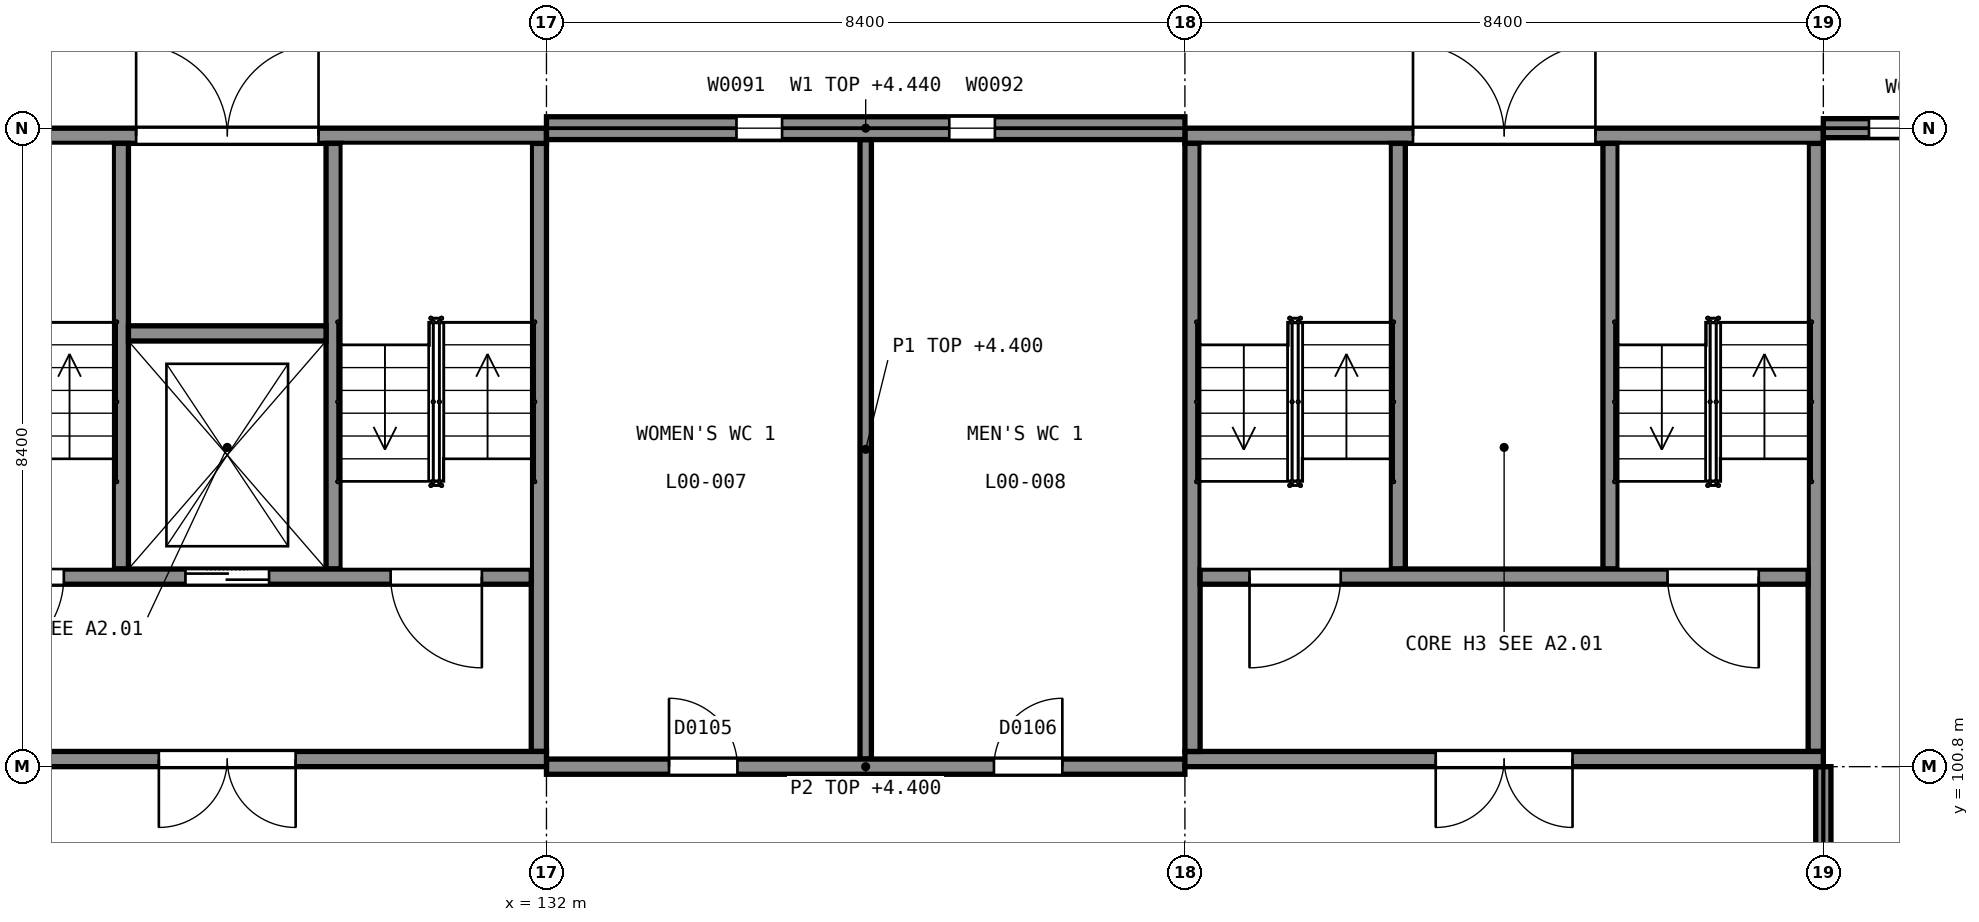
"""IFC4 building model, lengths in metres.
Left out: names, types, materials, properties, quantities, classifications, styles, units other than length and angle.
Written with IfcOpenShell. Run it as: python <this file> out.ifc"""

import sys

from ifc_helpers import new_model, si_unit, direction, frame, frame_2d, origin, place, context, subcontext, project, spatial, rectangle, extrude, element, fill, save


model = new_model("IFC4")
c1 = context("Model", 3, precision=1e-05, world=origin(), true_north=direction((0.0, 1.0)))
c2 = subcontext(c1, "Body", "Model", "MODEL_VIEW")
j1 = project(units=[si_unit("LENGTHUNIT", "METRE"), si_unit("PLANEANGLEUNIT", "RADIAN")], contexts=[c1])
p1 = place(None, origin())
s1 = spatial("IfcSite", under=j1, at=p1, CompositionType="ELEMENT")
p2 = place(p1, origin())
s2 = spatial("IfcBuilding", under=s1, at=p2, CompositionType="ELEMENT")
p3 = place(p2, origin())
s3 = spatial("IfcBuildingStorey", under=s2, at=p3, CompositionType="ELEMENT", Elevation=0.0)
p4 = place(p3, frame((140.4, 100.9, -1.8), z_axis=(0.0, 0.0, 1.0), x_axis=(1.0, 0.0, 0.0)))
e1 = element("IfcWall", 1, at=p4, inside=s3, PredefinedType="SHEAR", context=c2, shape_type="SweptSolid", body=[
    extrude(rectangle(XDim=8.4, YDim=0.2, at=frame_2d((4.2, 0.0))), origin(), (0.0, 0.0, 1.0), 7.3),
])
p5 = place(p4, frame((3.3, 0.0, 1.8)))
e2 = element("IfcOpeningElement", 2, at=p5, cuts=e1, PredefinedType="OPENING", context=c2, shape_type="SweptSolid", body=[
    extrude(rectangle(XDim=1.8, YDim=2.1, at=frame_2d((0.9, 1.05))), frame((0.0, 0.11, 0.0), z_axis=(0.0, -1.0, 0.0), x_axis=(1.0, 0.0, 0.0)), (0.0, 0.0, 1.0), 0.22),
])
p6 = place(p3, frame((140.4, 109.1, -1.8), z_axis=(0.0, 0.0, 1.0), x_axis=(1.0, 0.0, 0.0)))
e3 = element("IfcWall", 3, at=p6, inside=s3, PredefinedType="SHEAR", context=c2, shape_type="SweptSolid", body=[
    extrude(rectangle(XDim=8.4, YDim=0.2, at=frame_2d((4.2, 0.0))), origin(), (0.0, 0.0, 1.0), 7.3),
])
p7 = place(p6, frame((3.001, 0.0, 1.8)))
e4 = element("IfcOpeningElement", 4, at=p7, cuts=e3, PredefinedType="OPENING", context=c2, shape_type="SweptSolid", body=[
    extrude(rectangle(XDim=2.4, YDim=2.1, at=frame_2d((1.2, 1.05))), frame((0.0, 0.11, 0.0), z_axis=(0.0, -1.0, 0.0), x_axis=(1.0, 0.0, 0.0)), (0.0, 0.0, 1.0), 0.22),
])
for number, where, z_axis, x_axis in (
    (5, (140.5, 101.0, -1.8), (0.0, 0.0, 1.0), (0.0, 1.0, 0.0)),
    (6, (148.7, 101.0, -1.8), (0.0, 0.0, 1.0), (0.0, 1.0, 0.0)),
):
    element("IfcWall", number, at=place(p3, frame(where, z_axis=z_axis, x_axis=x_axis)), inside=s3, PredefinedType="SHEAR", context=c2, shape_type="SweptSolid", body=[
        extrude(rectangle(XDim=8.0, YDim=0.2, at=frame_2d((4.0, 0.0))), origin(), (0.0, 0.0, 1.0), 7.3),
    ])
p8 = place(p3, frame((140.6, 103.3, -1.8), z_axis=(0.0, 0.0, 1.0), x_axis=(1.0, 0.0, 0.0)))
e7 = element("IfcWall", 7, at=p8, inside=s3, PredefinedType="SHEAR", context=c2, shape_type="SweptSolid", body=[
    extrude(rectangle(XDim=8.0, YDim=0.2, at=frame_2d((4.0, 0.0))), origin(), (0.0, 0.0, 1.0), 7.3),
])
p9 = place(p8, frame((0.65, 0.0, 1.8)))
e8 = element("IfcOpeningElement", 8, at=p9, cuts=e7, PredefinedType="OPENING", context=c2, shape_type="SweptSolid", body=[
    extrude(rectangle(XDim=1.2, YDim=2.1, at=frame_2d((0.6, 1.05))), frame((0.0, 0.11, 0.0), z_axis=(0.0, -1.0, 0.0), x_axis=(1.0, 0.0, 0.0)), (0.0, 0.0, 1.0), 0.22),
])
p10 = place(p8, frame((6.15, 0.0, 1.8)))
e9 = element("IfcOpeningElement", 9, at=p10, cuts=e7, PredefinedType="OPENING", context=c2, shape_type="SweptSolid", body=[
    extrude(rectangle(XDim=1.2, YDim=2.1, at=frame_2d((0.6, 1.05))), frame((0.0, 0.11, 0.0), z_axis=(0.0, -1.0, 0.0), x_axis=(1.0, 0.0, 0.0)), (0.0, 0.0, 1.0), 0.22),
])
for number, where, z_axis, x_axis in (
    (10, (143.2, 103.4, -1.8), (0.0, 0.0, 1.0), (0.0, 1.0, 0.0)),
    (11, (146.0, 103.4, -1.8), (0.0, 0.0, 1.0), (0.0, 1.0, 0.0)),
):
    element("IfcWall", number, at=place(p3, frame(where, z_axis=z_axis, x_axis=x_axis)), inside=s3, PredefinedType="SHEAR", context=c2, shape_type="SweptSolid", body=[
        extrude(rectangle(XDim=5.6, YDim=0.2, at=frame_2d((2.8, 0.0))), origin(), (0.0, 0.0, 1.0), 7.3),
    ])
p11 = place(p3, frame((123.6, 100.9, -1.8), z_axis=(0.0, 0.0, 1.0), x_axis=(1.0, 0.0, 0.0)))
e12 = element("IfcWall", 12, at=p11, inside=s3, PredefinedType="SHEAR", context=c2, shape_type="SweptSolid", body=[
    extrude(rectangle(XDim=8.4, YDim=0.2, at=frame_2d((4.2, 0.0))), origin(), (0.0, 0.0, 1.0), 7.3),
])
p12 = place(p11, frame((3.3, 0.0, 1.8)))
e13 = element("IfcOpeningElement", 13, at=p12, cuts=e12, PredefinedType="OPENING", context=c2, shape_type="SweptSolid", body=[
    extrude(rectangle(XDim=1.8, YDim=2.1, at=frame_2d((0.9, 1.05))), frame((0.0, 0.11, 0.0), z_axis=(0.0, -1.0, 0.0), x_axis=(1.0, 0.0, 0.0)), (0.0, 0.0, 1.0), 0.22),
])
p13 = place(p3, frame((123.6, 109.1, -1.8), z_axis=(0.0, 0.0, 1.0), x_axis=(1.0, 0.0, 0.0)))
e14 = element("IfcWall", 14, at=p13, inside=s3, PredefinedType="SHEAR", context=c2, shape_type="SweptSolid", body=[
    extrude(rectangle(XDim=8.4, YDim=0.2, at=frame_2d((4.2, 0.0))), origin(), (0.0, 0.0, 1.0), 7.3),
])
p14 = place(p13, frame((3.001, 0.0, 1.8)))
e15 = element("IfcOpeningElement", 15, at=p14, cuts=e14, PredefinedType="OPENING", context=c2, shape_type="SweptSolid", body=[
    extrude(rectangle(XDim=2.4, YDim=2.1, at=frame_2d((1.2, 1.05))), frame((0.0, 0.11, 0.0), z_axis=(0.0, -1.0, 0.0), x_axis=(1.0, 0.0, 0.0)), (0.0, 0.0, 1.0), 0.22),
])
p15 = place(p3, frame((131.9, 101.0, -1.8), z_axis=(0.0, 0.0, 1.0), x_axis=(0.0, 1.0, 0.0)))
e16 = element("IfcWall", 16, at=p15, inside=s3, PredefinedType="SHEAR", context=c2, shape_type="SweptSolid", body=[
    extrude(rectangle(XDim=8.0, YDim=0.2, at=frame_2d((4.0, 0.0))), origin(), (0.0, 0.0, 1.0), 7.3),
])
p16 = place(p3, frame((123.8, 103.3, -1.8), z_axis=(0.0, 0.0, 1.0), x_axis=(1.0, 0.0, 0.0)))
e17 = element("IfcWall", 17, at=p16, inside=s3, PredefinedType="SHEAR", context=c2, shape_type="SweptSolid", body=[
    extrude(rectangle(XDim=8.0, YDim=0.2, at=frame_2d((4.0, 0.0))), origin(), (0.0, 0.0, 1.0), 7.3),
])
p17 = place(p16, frame((0.65, 0.0, 1.8)))
e18 = element("IfcOpeningElement", 18, at=p17, cuts=e17, PredefinedType="OPENING", context=c2, shape_type="SweptSolid", body=[
    extrude(rectangle(XDim=1.2, YDim=2.1, at=frame_2d((0.6, 1.05))), frame((0.0, 0.11, 0.0), z_axis=(0.0, -1.0, 0.0), x_axis=(1.0, 0.0, 0.0)), (0.0, 0.0, 1.0), 0.22),
])
p18 = place(p16, frame((6.15, 0.0, 1.8)))
e19 = element("IfcOpeningElement", 19, at=p18, cuts=e17, PredefinedType="OPENING", context=c2, shape_type="SweptSolid", body=[
    extrude(rectangle(XDim=1.2, YDim=2.1, at=frame_2d((0.6, 1.05))), frame((0.0, 0.11, 0.0), z_axis=(0.0, -1.0, 0.0), x_axis=(1.0, 0.0, 0.0)), (0.0, 0.0, 1.0), 0.22),
])
p19 = place(p16, frame((3.45, 0.0, 1.8)))
e20 = element("IfcOpeningElement", 20, at=p19, cuts=e17, PredefinedType="OPENING", context=c2, shape_type="SweptSolid", body=[
    extrude(rectangle(XDim=1.1, YDim=2.1, at=frame_2d((0.55, 1.05))), frame((0.0, 0.11, 0.0), z_axis=(0.0, -1.0, 0.0), x_axis=(1.0, 0.0, 0.0)), (0.0, 0.0, 1.0), 0.22),
])
for number, where, z_axis, x_axis in (
    (21, (126.4, 103.4, -1.8), (0.0, 0.0, 1.0), (0.0, 1.0, 0.0)),
    (22, (129.2, 103.4, -1.8), (0.0, 0.0, 1.0), (0.0, 1.0, 0.0)),
):
    element("IfcWall", number, at=place(p3, frame(where, z_axis=z_axis, x_axis=x_axis)), inside=s3, PredefinedType="SHEAR", context=c2, shape_type="SweptSolid", body=[
        extrude(rectangle(XDim=5.6, YDim=0.2, at=frame_2d((2.8, 0.0))), origin(), (0.0, 0.0, 1.0), 7.3),
    ])
p20 = place(p3, frame((126.5, 106.5, -1.8), z_axis=(0.0, 0.0, 1.0), x_axis=(1.0, 0.0, 0.0)))
e23 = element("IfcWall", 23, at=p20, inside=s3, PredefinedType="SHEAR", context=c2, shape_type="SweptSolid", body=[
    extrude(rectangle(XDim=2.6, YDim=0.2, at=frame_2d((1.3, 0.0))), origin(), (0.0, 0.0, 1.0), 7.3),
])
p21 = place(p3, frame((148.8, 109.2, 0.0), z_axis=(0.0, 0.0, 1.0), x_axis=(1.0, 0.0, 0.0)))
e24 = element("IfcWall", 24, at=p21, inside=s3, PredefinedType="SOLIDWALL", context=c2, shape_type="SweptSolid", body=[
    extrude(rectangle(XDim=8.0, YDim=0.25, at=frame_2d((4.0, 0.0))), origin(), (0.0, 0.0, 1.0), 4.44),
])
p22 = place(p21, frame((0.6, 0.0, 0.9)))
e25 = element("IfcOpeningElement", 25, at=p22, cuts=e24, PredefinedType="OPENING", context=c2, shape_type="SweptSolid", body=[
    extrude(rectangle(XDim=1.2, YDim=2.1, at=frame_2d((0.6, 1.05))), frame((0.0, 0.135, 0.0), z_axis=(0.0, -1.0, 0.0), x_axis=(1.0, 0.0, 0.0)), (0.0, 0.0, 1.0), 0.27),
])
p23 = place(p21, frame((3.4, 0.0, 0.9)))
e26 = element("IfcOpeningElement", 26, at=p23, cuts=e24, PredefinedType="OPENING", context=c2, shape_type="SweptSolid", body=[
    extrude(rectangle(XDim=1.2, YDim=2.1, at=frame_2d((0.6, 1.05))), frame((0.0, 0.135, 0.0), z_axis=(0.0, -1.0, 0.0), x_axis=(1.0, 0.0, 0.0)), (0.0, 0.0, 1.0), 0.27),
])
p24 = place(p21, frame((6.2, 0.0, 0.9)))
e27 = element("IfcOpeningElement", 27, at=p24, cuts=e24, PredefinedType="OPENING", context=c2, shape_type="SweptSolid", body=[
    extrude(rectangle(XDim=1.2, YDim=2.1, at=frame_2d((0.6, 1.05))), frame((0.0, 0.135, 0.0), z_axis=(0.0, -1.0, 0.0), x_axis=(1.0, 0.0, 0.0)), (0.0, 0.0, 1.0), 0.27),
])
p25 = place(p3, frame((132.0, 109.2, 0.0), z_axis=(0.0, 0.0, 1.0), x_axis=(1.0, 0.0, 0.0)))
e28 = element("IfcWall", 28, at=p25, inside=s3, PredefinedType="SOLIDWALL", context=c2, shape_type="SweptSolid", body=[
    extrude(rectangle(XDim=8.4, YDim=0.3, at=frame_2d((4.2, 0.0))), origin(), (0.0, 0.0, 1.0), 4.44),
])
p26 = place(p25, frame((2.5, 0.0, 1.5)))
e29 = element("IfcOpeningElement", 29, at=p26, cuts=e28, PredefinedType="OPENING", context=c2, shape_type="SweptSolid", body=[
    extrude(rectangle(XDim=0.6, YDim=2.4, at=frame_2d((0.3, 1.2))), frame((0.0, 0.16, 0.0), z_axis=(0.0, -1.0, 0.0), x_axis=(1.0, 0.0, 0.0)), (0.0, 0.0, 1.0), 0.32),
])
p27 = place(p25, frame((5.3, 0.0, 1.5)))
e30 = element("IfcOpeningElement", 30, at=p27, cuts=e28, PredefinedType="OPENING", context=c2, shape_type="SweptSolid", body=[
    extrude(rectangle(XDim=0.6, YDim=2.4, at=frame_2d((0.3, 1.2))), frame((0.0, 0.16, 0.0), z_axis=(0.0, -1.0, 0.0), x_axis=(1.0, 0.0, 0.0)), (0.0, 0.0, 1.0), 0.32),
])
p28 = place(p3, frame((136.2, 100.9, 0.0), z_axis=(0.0, 0.0, 1.0), x_axis=(0.0, 1.0, 0.0)))
e31 = element("IfcWall", 31, at=p28, inside=s3, PredefinedType="PARTITIONING", context=c2, shape_type="SweptSolid", body=[
    extrude(rectangle(XDim=8.15, YDim=0.15, at=frame_2d((4.075, 0.0))), origin(), (0.0, 0.0, 1.0), 4.4),
])
p29 = place(p3, frame((132.0, 100.8, 0.0), z_axis=(0.0, 0.0, 1.0), x_axis=(1.0, 0.0, 0.0)))
e32 = element("IfcWall", 32, at=p29, inside=s3, PredefinedType="PARTITIONING", context=c2, shape_type="SweptSolid", body=[
    extrude(rectangle(XDim=8.4, YDim=0.2, at=frame_2d((4.2, 0.0))), origin(), (0.0, 0.0, 1.0), 4.4),
])
p30 = place(p29, frame((1.613, 0.0, 0.0)))
e33 = element("IfcOpeningElement", 33, at=p30, cuts=e32, PredefinedType="OPENING", context=c2, shape_type="SweptSolid", body=[
    extrude(rectangle(XDim=0.9, YDim=2.1, at=frame_2d((0.45, 1.05))), frame((0.0, 0.11, 0.0), z_axis=(0.0, -1.0, 0.0), x_axis=(1.0, 0.0, 0.0)), (0.0, 0.0, 1.0), 0.22),
])
p31 = place(p29, frame((5.887, 0.0, 0.0)))
e34 = element("IfcOpeningElement", 34, at=p31, cuts=e32, PredefinedType="OPENING", context=c2, shape_type="SweptSolid", body=[
    extrude(rectangle(XDim=0.9, YDim=2.1, at=frame_2d((0.45, 1.05))), frame((0.0, 0.11, 0.0), z_axis=(0.0, -1.0, 0.0), x_axis=(1.0, 0.0, 0.0)), (0.0, 0.0, 1.0), 0.22),
])
p32 = place(p3, frame((148.8, 92.8, 0.0), z_axis=(0.0, 0.0, 1.0), x_axis=(0.0, 1.0, 0.0)))
e35 = element("IfcWall", 35, at=p32, inside=s3, PredefinedType="PARTITIONING", context=c2, shape_type="SweptSolid", body=[
    extrude(rectangle(XDim=8.0, YDim=0.2, at=frame_2d((4.0, 0.0))), origin(), (0.0, 0.0, 1.0), 4.4),
])
p33 = place(p32, frame((4.575, 0.0, 0.0)))
e36 = element("IfcOpeningElement", 36, at=p33, cuts=e35, PredefinedType="OPENING", context=c2, shape_type="SweptSolid", body=[
    extrude(rectangle(XDim=2.4, YDim=2.4, at=frame_2d((1.2, 1.2))), frame((0.0, 0.11, 0.0), z_axis=(0.0, -1.0, 0.0), x_axis=(1.0, 0.0, 0.0)), (0.0, 0.0, 1.0), 0.22),
])
p34 = place(p22, origin())
e37 = element("IfcWindow", 37, at=p34, inside=s3, PartitioningType="SINGLE_PANEL", PredefinedType="WINDOW", context=c2, shape_type="SweptSolid", body=[
    extrude(rectangle(XDim=1.2, YDim=2.1, at=frame_2d((0.6, 1.05))), frame((0.0, -0.045, 0.0), z_axis=(0.0, -1.0, 0.0), x_axis=(1.0, 0.0, 0.0)), (0.0, 0.0, 1.0), 0.06),
])
fill(e25, e37)
p35 = place(p26, origin())
e38 = element("IfcWindow", 38, at=p35, inside=s3, PartitioningType="SINGLE_PANEL", PredefinedType="WINDOW", context=c2, shape_type="SweptSolid", body=[
    extrude(rectangle(XDim=0.6, YDim=2.4, at=frame_2d((0.3, 1.2))), frame((0.0, -0.07, 0.0), z_axis=(0.0, -1.0, 0.0), x_axis=(1.0, 0.0, 0.0)), (0.0, 0.0, 1.0), 0.06),
])
fill(e29, e38)
p36 = place(p27, origin())
e39 = element("IfcWindow", 39, at=p36, inside=s3, PartitioningType="SINGLE_PANEL", PredefinedType="WINDOW", context=c2, shape_type="SweptSolid", body=[
    extrude(rectangle(XDim=0.6, YDim=2.4, at=frame_2d((0.3, 1.2))), frame((0.0, -0.07, 0.0), z_axis=(0.0, -1.0, 0.0), x_axis=(1.0, 0.0, 0.0)), (0.0, 0.0, 1.0), 0.06),
])
fill(e30, e39)
p37 = place(p7, origin())
e40 = element("IfcDoor", 40, at=p37, inside=s3, OperationType="DOUBLE_DOOR_SINGLE_SWING", PredefinedType="DOOR", context=c2, shape_type="SweptSolid", body=[
    extrude(rectangle(XDim=2.4, YDim=2.1, at=frame_2d((1.2, 1.05))), frame((0.0, 0.025, 0.0), z_axis=(0.0, -1.0, 0.0), x_axis=(1.0, 0.0, 0.0)), (0.0, 0.0, 1.0), 0.05),
])
fill(e4, e40)
p38 = place(p14, origin())
e41 = element("IfcDoor", 41, at=p38, inside=s3, OperationType="DOUBLE_DOOR_SINGLE_SWING", PredefinedType="DOOR", context=c2, shape_type="SweptSolid", body=[
    extrude(rectangle(XDim=2.4, YDim=2.1, at=frame_2d((1.2, 1.05))), frame((0.0, 0.025, 0.0), z_axis=(0.0, -1.0, 0.0), x_axis=(1.0, 0.0, 0.0)), (0.0, 0.0, 1.0), 0.05),
])
fill(e15, e41)
p39 = place(p30, origin())
e42 = element("IfcDoor", 42, at=p39, inside=s3, OperationType="SINGLE_SWING_RIGHT", PredefinedType="DOOR", context=c2, shape_type="SweptSolid", body=[
    extrude(rectangle(XDim=0.9, YDim=2.1, at=frame_2d((0.45, 1.05))), frame((0.0, 0.025, 0.0), z_axis=(0.0, -1.0, 0.0), x_axis=(1.0, 0.0, 0.0)), (0.0, 0.0, 1.0), 0.05),
])
fill(e33, e42)
p40 = place(p31, origin())
e43 = element("IfcDoor", 43, at=p40, inside=s3, OperationType="SINGLE_SWING_LEFT", PredefinedType="DOOR", context=c2, shape_type="SweptSolid", body=[
    extrude(rectangle(XDim=0.9, YDim=2.1, at=frame_2d((0.45, 1.05))), frame((0.0, 0.025, 0.0), z_axis=(0.0, -1.0, 0.0), x_axis=(1.0, 0.0, 0.0)), (0.0, 0.0, 1.0), 0.05),
])
fill(e34, e43)
p41 = place(p5, origin())
e44 = element("IfcDoor", 44, at=p41, inside=s3, OperationType="DOUBLE_DOOR_SINGLE_SWING", PredefinedType="DOOR", context=c2, shape_type="SweptSolid", body=[
    extrude(rectangle(XDim=1.8, YDim=2.1, at=frame_2d((0.9, 1.05))), frame((0.0, 0.025, 0.0), z_axis=(0.0, -1.0, 0.0), x_axis=(1.0, 0.0, 0.0)), (0.0, 0.0, 1.0), 0.05),
])
fill(e2, e44)
p42 = place(p9, origin())
e45 = element("IfcDoor", 45, at=p42, inside=s3, OperationType="SINGLE_SWING_LEFT", PredefinedType="DOOR", context=c2, shape_type="SweptSolid", body=[
    extrude(rectangle(XDim=1.2, YDim=2.1, at=frame_2d((0.6, 1.05))), frame((0.0, 0.025, 0.0), z_axis=(0.0, -1.0, 0.0), x_axis=(1.0, 0.0, 0.0)), (0.0, 0.0, 1.0), 0.05),
])
fill(e8, e45)
p43 = place(p10, origin())
e46 = element("IfcDoor", 46, at=p43, inside=s3, OperationType="SINGLE_SWING_RIGHT", PredefinedType="DOOR", context=c2, shape_type="SweptSolid", body=[
    extrude(rectangle(XDim=1.2, YDim=2.1, at=frame_2d((0.6, 1.05))), frame((0.0, 0.025, 0.0), z_axis=(0.0, -1.0, 0.0), x_axis=(1.0, 0.0, 0.0)), (0.0, 0.0, 1.0), 0.05),
])
fill(e9, e46)
p44 = place(p12, origin())
e47 = element("IfcDoor", 47, at=p44, inside=s3, OperationType="DOUBLE_DOOR_SINGLE_SWING", PredefinedType="DOOR", context=c2, shape_type="SweptSolid", body=[
    extrude(rectangle(XDim=1.8, YDim=2.1, at=frame_2d((0.9, 1.05))), frame((0.0, 0.025, 0.0), z_axis=(0.0, -1.0, 0.0), x_axis=(1.0, 0.0, 0.0)), (0.0, 0.0, 1.0), 0.05),
])
fill(e13, e47)
p45 = place(p17, origin())
e48 = element("IfcDoor", 48, at=p45, inside=s3, OperationType="SINGLE_SWING_LEFT", PredefinedType="DOOR", context=c2, shape_type="SweptSolid", body=[
    extrude(rectangle(XDim=1.2, YDim=2.1, at=frame_2d((0.6, 1.05))), frame((0.0, 0.025, 0.0), z_axis=(0.0, -1.0, 0.0), x_axis=(1.0, 0.0, 0.0)), (0.0, 0.0, 1.0), 0.05),
])
fill(e18, e48)
p46 = place(p18, origin())
e49 = element("IfcDoor", 49, at=p46, inside=s3, OperationType="SINGLE_SWING_RIGHT", PredefinedType="DOOR", context=c2, shape_type="SweptSolid", body=[
    extrude(rectangle(XDim=1.2, YDim=2.1, at=frame_2d((0.6, 1.05))), frame((0.0, 0.025, 0.0), z_axis=(0.0, -1.0, 0.0), x_axis=(1.0, 0.0, 0.0)), (0.0, 0.0, 1.0), 0.05),
])
fill(e19, e49)
p47 = place(p19, origin())
e50 = element("IfcDoor", 50, at=p47, inside=s3, OperationType="DOUBLE_DOOR_SLIDING", PredefinedType="DOOR", context=c2, shape_type="SweptSolid", body=[
    extrude(rectangle(XDim=1.1, YDim=2.1, at=frame_2d((0.55, 1.05))), frame((0.0, 0.025, 0.0), z_axis=(0.0, -1.0, 0.0), x_axis=(1.0, 0.0, 0.0)), (0.0, 0.0, 1.0), 0.05),
])
fill(e20, e50)
save(model, sys.argv[1])
